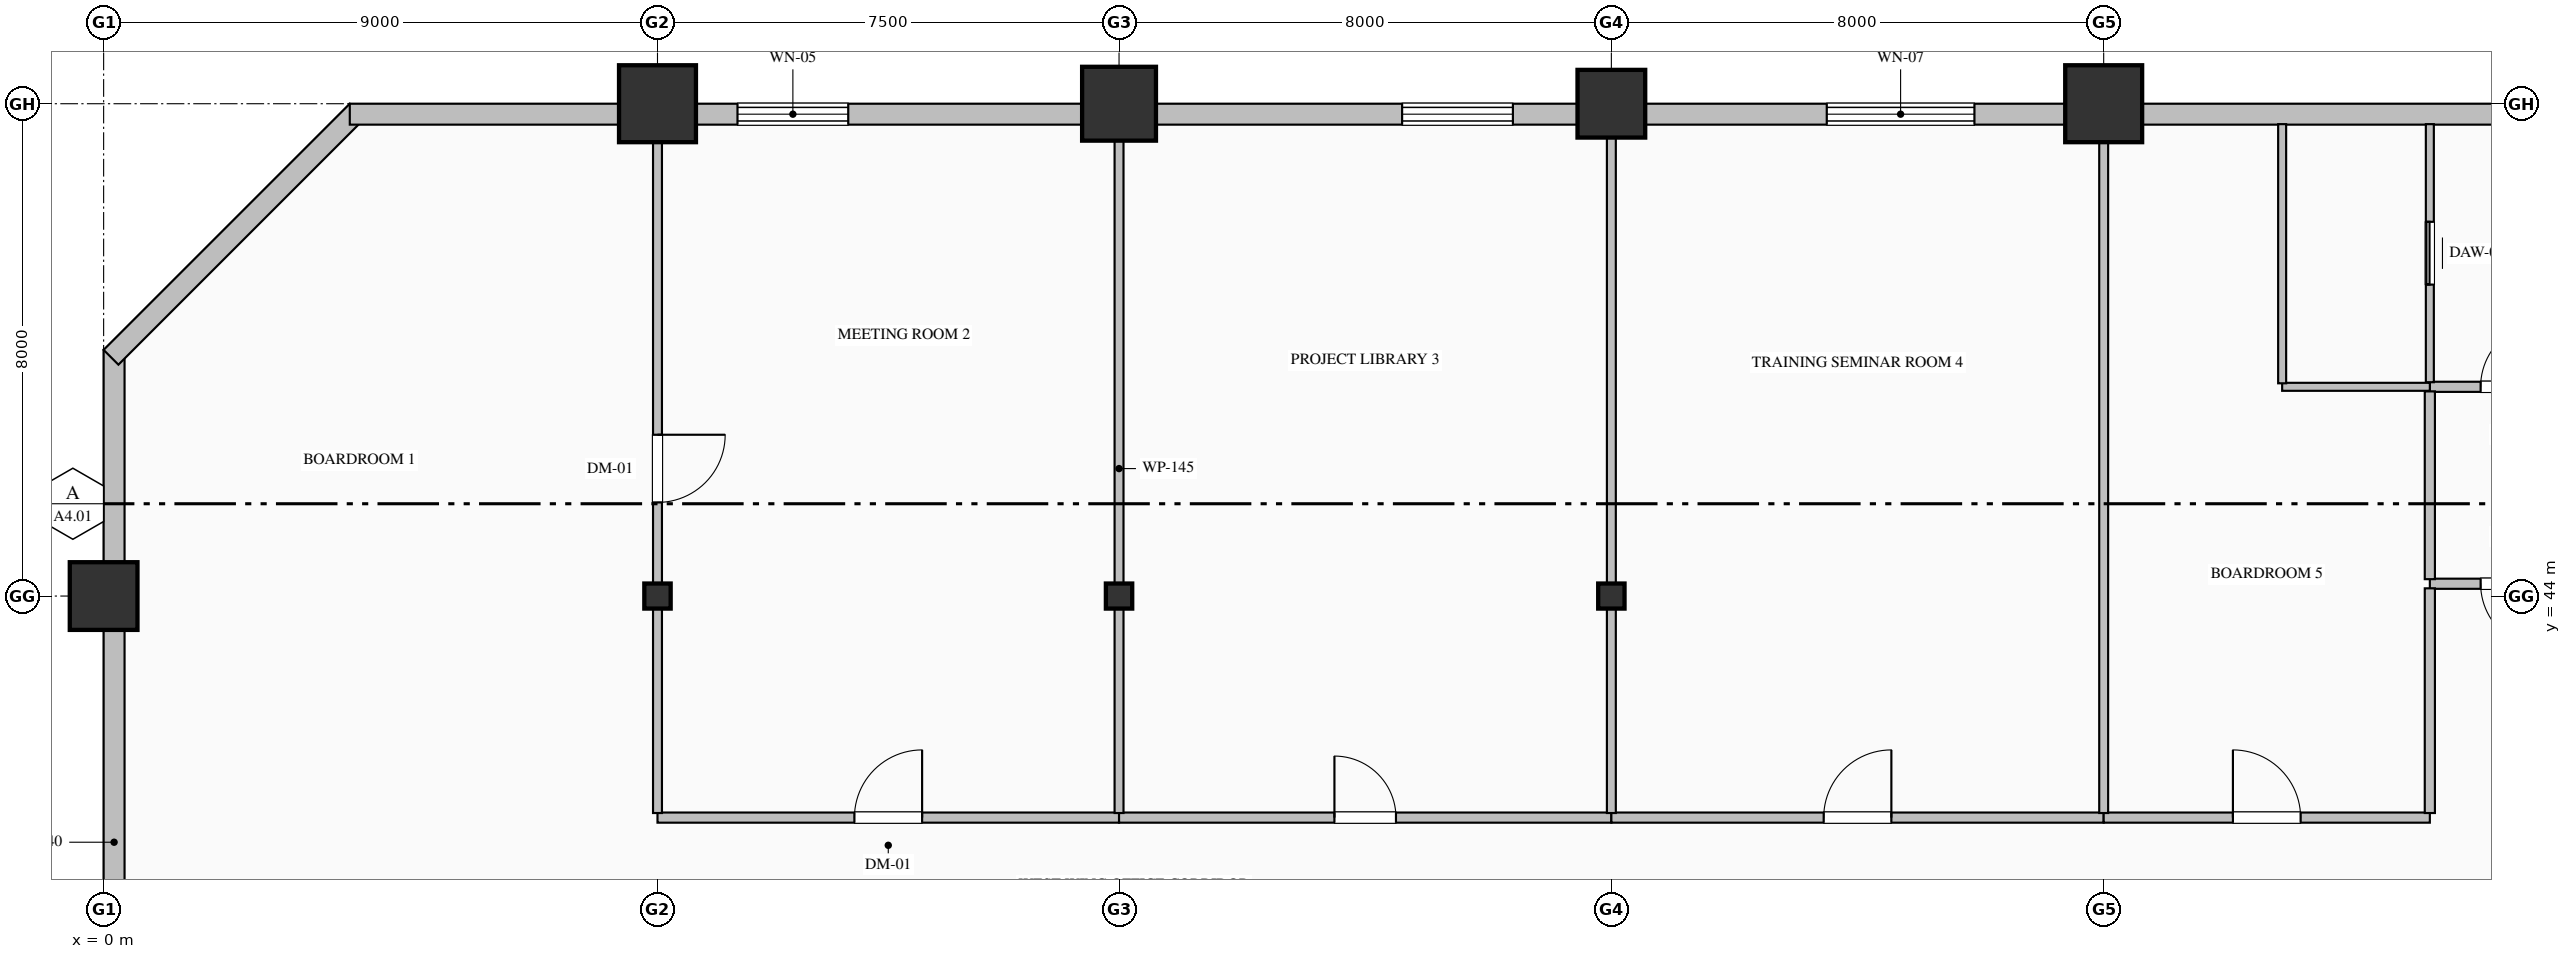
"""IFC4 building model, lengths in metres.
Left out: names, types, materials, properties, quantities, classifications, styles, units other than length and angle.
Written with IfcOpenShell. Run it as: python <this file> out.ifc"""

import sys

from ifc_helpers import new_model, si_unit, direction, frame, frame_2d, origin, origin_2d, place, context, subcontext, project, spatial, rectangle, hollow_rectangle, hollow_circle, i_section, extrude, element, fill, save


model = new_model("IFC4")
c1 = context("Model", 3, precision=1e-05, world=origin(), true_north=direction((0.0, 1.0)))
c2 = subcontext(c1, "Body", "Model", "MODEL_VIEW")
j1 = project(units=[si_unit("LENGTHUNIT", "METRE"), si_unit("PLANEANGLEUNIT", "RADIAN")], contexts=[c1])
p1 = place(None, origin())
s1 = spatial("IfcSite", under=j1, at=p1, CompositionType="ELEMENT")
p2 = place(p1, origin())
s2 = spatial("IfcBuilding", under=s1, at=p2, CompositionType="ELEMENT")
p3 = place(p2, frame((0.0, 0.0, 52.2)))
s3 = spatial("IfcBuildingStorey", under=s2, at=p3, CompositionType="ELEMENT", Elevation=52.2)
p4 = place(p3, frame((0.0, 44.0, 0.0), z_axis=(0.0, 0.0, 1.0), x_axis=(1.0, 0.0, 0.0)))
e1 = element("IfcColumn", 1, at=p4, inside=s3, PredefinedType="COLUMN", context=c2, shape_type="SweptSolid", body=[
    extrude(hollow_rectangle(XDim=1.1, YDim=1.1, WallThickness=0.04, at=origin_2d()), origin(), (0.0, 0.0, 1.0), 4.0),
])
p5 = place(p3, frame((9.0, 44.0, 0.0), z_axis=(0.0, 0.0, 1.0), x_axis=(1.0, 0.0, 0.0)))
e2 = element("IfcColumn", 2, at=p5, inside=s3, PredefinedType="COLUMN", context=c2, shape_type="SweptSolid", body=[
    extrude(i_section(OverallWidth=0.407, OverallDepth=0.428, WebThickness=0.02, FlangeThickness=0.035, FilletRadius=0.022, at=origin_2d()), origin(), (0.0, 0.0, 1.0), 4.0),
])
p6 = place(p3, frame((9.0, 52.0, 0.0), z_axis=(0.0, 0.0, 1.0), x_axis=(1.0, 0.0, 0.0)))
e3 = element("IfcColumn", 3, at=p6, inside=s3, PredefinedType="COLUMN", context=c2, shape_type="SweptSolid", body=[
    extrude(hollow_rectangle(XDim=1.25, YDim=1.25, WallThickness=0.045, at=origin_2d()), origin(), (0.0, 0.0, 1.0), 4.0),
])
p7 = place(p3, frame((16.5, 44.0, 0.0), z_axis=(0.0, 0.0, 1.0), x_axis=(1.0, 0.0, 0.0)))
e4 = element("IfcColumn", 4, at=p7, inside=s3, PredefinedType="COLUMN", context=c2, shape_type="SweptSolid", body=[
    extrude(i_section(OverallWidth=0.407, OverallDepth=0.428, WebThickness=0.02, FlangeThickness=0.035, FilletRadius=0.022, at=origin_2d()), origin(), (0.0, 0.0, 1.0), 4.0),
])
p8 = place(p3, frame((16.5, 52.0, 0.0), z_axis=(0.0, 0.0, 1.0), x_axis=(1.0, 0.0, 0.0)))
e5 = element("IfcColumn", 5, at=p8, inside=s3, PredefinedType="COLUMN", context=c2, shape_type="SweptSolid", body=[
    extrude(hollow_circle(Radius=0.6, WallThickness=0.04, at=origin_2d()), origin(), (0.0, 0.0, 1.0), 4.0),
])
p9 = place(p3, frame((24.5, 44.0, 0.0), z_axis=(0.0, 0.0, 1.0), x_axis=(1.0, 0.0, 0.0)))
e6 = element("IfcColumn", 6, at=p9, inside=s3, PredefinedType="COLUMN", context=c2, shape_type="SweptSolid", body=[
    extrude(i_section(OverallWidth=0.407, OverallDepth=0.428, WebThickness=0.02, FlangeThickness=0.035, FilletRadius=0.022, at=origin_2d()), origin(), (0.0, 0.0, 1.0), 4.0),
])
p10 = place(p3, frame((24.5, 52.0, 0.0), z_axis=(0.0, 0.0, 1.0), x_axis=(1.0, 0.0, 0.0)))
e7 = element("IfcColumn", 7, at=p10, inside=s3, PredefinedType="COLUMN", context=c2, shape_type="SweptSolid", body=[
    extrude(hollow_rectangle(XDim=1.1, YDim=1.1, WallThickness=0.04, at=origin_2d()), origin(), (0.0, 0.0, 1.0), 4.0),
])
p11 = place(p3, frame((32.5, 52.0, 0.0), z_axis=(0.0, 0.0, 1.0), x_axis=(1.0, 0.0, 0.0)))
e8 = element("IfcColumn", 8, at=p11, inside=s3, PredefinedType="COLUMN", context=c2, shape_type="SweptSolid", body=[
    extrude(hollow_rectangle(XDim=1.25, YDim=1.25, WallThickness=0.045, at=origin_2d()), origin(), (0.0, 0.0, 1.0), 4.0),
])
p12 = place(p3, frame((0.17, 32.0, 0.0), z_axis=(0.0, 0.0, 1.0), x_axis=(0.0, 1.0, 0.0)))
e9 = element("IfcWall", 9, at=p12, inside=s3, PredefinedType="SOLIDWALL", context=c2, shape_type="SweptSolid", body=[
    extrude(rectangle(XDim=16.0, YDim=0.34, at=frame_2d((8.0, 0.0))), origin(), (0.0, 0.0, 1.0), 3.25),
])
p13 = place(p3, frame((0.12, 47.88, 0.0), z_axis=(0.0, 0.0, 1.0), x_axis=(0.707106781187, 0.707106781187, 0.0)))
e10 = element("IfcWall", 10, at=p13, inside=s3, PredefinedType="SOLIDWALL", context=c2, shape_type="SweptSolid", body=[
    extrude(rectangle(XDim=5.657, YDim=0.34, at=frame_2d((2.828, 0.0))), origin(), (0.0, 0.0, 1.0), 3.75),
])
p14 = place(p3, frame((4.0, 51.83, 0.0), z_axis=(0.0, 0.0, 1.0), x_axis=(1.0, 0.0, 0.0)))
e11 = element("IfcWall", 11, at=p14, inside=s3, PredefinedType="SOLIDWALL", context=c2, shape_type="SweptSolid", body=[
    extrude(rectangle(XDim=36.52, YDim=0.34, at=frame_2d((18.26, 0.0))), origin(), (0.0, 0.0, 1.0), 3.25),
])
p15 = place(p14, frame((6.3, 0.0, 0.85)))
e12 = element("IfcOpeningElement", 12, at=p15, cuts=e11, PredefinedType="OPENING", context=c2, shape_type="SweptSolid", body=[
    extrude(rectangle(XDim=1.8, YDim=2.05, at=frame_2d((0.9, 1.025))), frame((0.0, 0.18, 0.0), z_axis=(0.0, -1.0, 0.0), x_axis=(1.0, 0.0, 0.0)), (0.0, 0.0, 1.0), 0.36),
])
p16 = place(p14, frame((17.1, 0.0, 0.85)))
e13 = element("IfcOpeningElement", 13, at=p16, cuts=e11, PredefinedType="OPENING", context=c2, shape_type="SweptSolid", body=[
    extrude(rectangle(XDim=1.8, YDim=2.05, at=frame_2d((0.9, 1.025))), frame((0.0, 0.18, 0.0), z_axis=(0.0, -1.0, 0.0), x_axis=(1.0, 0.0, 0.0)), (0.0, 0.0, 1.0), 0.36),
])
p17 = place(p14, frame((24.0, 0.0, 0.8)))
e14 = element("IfcOpeningElement", 14, at=p17, cuts=e11, PredefinedType="OPENING", context=c2, shape_type="SweptSolid", body=[
    extrude(rectangle(XDim=2.4, YDim=2.15, at=frame_2d((1.2, 1.075))), frame((0.0, 0.18, 0.0), z_axis=(0.0, -1.0, 0.0), x_axis=(1.0, 0.0, 0.0)), (0.0, 0.0, 1.0), 0.36),
])
p18 = place(p3, frame((37.8, 47.4, 0.0), z_axis=(0.0, 0.0, 1.0), x_axis=(1.0, 0.0, 0.0)))
e15 = element("IfcWall", 15, at=p18, inside=s3, PredefinedType="PARTITIONING", context=c2, shape_type="SweptSolid", body=[
    extrude(rectangle(XDim=2.7, YDim=0.165, at=frame_2d((1.35, 0.0))), origin(), (0.0, 0.0, 1.0), 3.75),
])
p19 = place(p18, frame((0.825, 0.0, 0.0)))
e16 = element("IfcOpeningElement", 16, at=p19, cuts=e15, PredefinedType="OPENING", context=c2, shape_type="SweptSolid", body=[
    extrude(rectangle(XDim=1.05, YDim=2.15, at=frame_2d((0.525, 1.075))), frame((0.0, 0.093, 0.0), z_axis=(0.0, -1.0, 0.0), x_axis=(1.0, 0.0, 0.0)), (0.0, 0.0, 1.0), 0.185),
])
p20 = place(p3, frame((40.5, 44.2, 0.0), z_axis=(0.0, 0.0, 1.0), x_axis=(-1.0, 0.0, 0.0)))
e17 = element("IfcWall", 17, at=p20, inside=s3, PredefinedType="PARTITIONING", context=c2, shape_type="SweptSolid", body=[
    extrude(rectangle(XDim=2.7, YDim=0.165, at=frame_2d((1.35, 0.0))), origin(), (0.0, 0.0, 1.0), 3.75),
])
p21 = place(p20, frame((0.825, 0.0, 0.0)))
e18 = element("IfcOpeningElement", 18, at=p21, cuts=e17, PredefinedType="OPENING", context=c2, shape_type="SweptSolid", body=[
    extrude(rectangle(XDim=1.05, YDim=2.15, at=frame_2d((0.525, 1.075))), frame((0.0, 0.093, 0.0), z_axis=(0.0, -1.0, 0.0), x_axis=(1.0, 0.0, 0.0)), (0.0, 0.0, 1.0), 0.185),
])
p22 = place(p3, frame((37.8, 44.274, 0.0), z_axis=(0.0, 0.0, 1.0), x_axis=(0.0, 1.0, 0.0)))
e19 = element("IfcWall", 19, at=p22, inside=s3, PredefinedType="PARTITIONING", context=c2, shape_type="SweptSolid", body=[
    extrude(rectangle(XDim=3.051, YDim=0.165, at=frame_2d((1.525, 0.0))), origin(), (0.0, 0.0, 1.0), 3.75),
])
p23 = place(p3, frame((37.8, 47.475, 0.0), z_axis=(0.0, 0.0, 1.0), x_axis=(0.0, 1.0, 0.0)))
e20 = element("IfcWall", 20, at=p23, inside=s3, PredefinedType="PARTITIONING", context=c2, shape_type="SweptSolid", body=[
    extrude(rectangle(XDim=4.193, YDim=0.13, at=frame_2d((2.097, 0.0))), origin(), (0.0, 0.0, 1.0), 3.75),
])
p24 = place(p23, frame((1.587, 0.0, 0.0)))
e21 = element("IfcOpeningElement", 21, at=p24, cuts=e20, PredefinedType="OPENING", context=c2, shape_type="SweptSolid", body=[
    extrude(rectangle(XDim=1.02, YDim=2.15, at=frame_2d((0.51, 1.075))), frame((0.0, 0.075, 0.0), z_axis=(0.0, -1.0, 0.0), x_axis=(1.0, 0.0, 0.0)), (0.0, 0.0, 1.0), 0.15),
])
p25 = place(p3, frame((37.8, 47.4, 0.0), z_axis=(0.0, 0.0, 1.0), x_axis=(-1.0, 0.0, 0.0)))
e22 = element("IfcWall", 22, at=p25, inside=s3, PredefinedType="PARTITIONING", context=c2, shape_type="SweptSolid", body=[
    extrude(rectangle(XDim=2.4, YDim=0.13, at=frame_2d((1.2, 0.0))), origin(), (0.0, 0.0, 1.0), 3.75),
])
p26 = place(p3, frame((35.4, 47.457, 0.0), z_axis=(0.0, 0.0, 1.0), x_axis=(0.0, 1.0, 0.0)))
e23 = element("IfcWall", 23, at=p26, inside=s3, PredefinedType="PARTITIONING", context=c2, shape_type="SweptSolid", body=[
    extrude(rectangle(XDim=4.211, YDim=0.13, at=frame_2d((2.105, 0.0))), origin(), (0.0, 0.0, 1.0), 3.75),
])
p27 = place(p3, frame((9.0, 40.4, 0.0), z_axis=(0.0, 0.0, 1.0), x_axis=(1.0, 0.0, 0.0)))
e24 = element("IfcWall", 24, at=p27, inside=s3, PredefinedType="PARTITIONING", context=c2, shape_type="SweptSolid", body=[
    extrude(rectangle(XDim=7.5, YDim=0.165, at=frame_2d((3.75, 0.0))), origin(), (0.0, 0.0, 1.0), 3.75),
])
p28 = place(p27, frame((3.2, 0.0, 0.0)))
e25 = element("IfcOpeningElement", 25, at=p28, cuts=e24, PredefinedType="OPENING", context=c2, shape_type="SweptSolid", body=[
    extrude(rectangle(XDim=1.1, YDim=2.2, at=frame_2d((0.55, 1.1))), frame((0.0, 0.093, 0.0), z_axis=(0.0, -1.0, 0.0), x_axis=(1.0, 0.0, 0.0)), (0.0, 0.0, 1.0), 0.185),
])
p29 = place(p3, frame((16.5, 40.4, 0.0), z_axis=(0.0, 0.0, 1.0), x_axis=(1.0, 0.0, 0.0)))
e26 = element("IfcWall", 26, at=p29, inside=s3, PredefinedType="PARTITIONING", context=c2, shape_type="SweptSolid", body=[
    extrude(rectangle(XDim=8.0, YDim=0.165, at=frame_2d((4.0, 0.0))), origin(), (0.0, 0.0, 1.0), 3.75),
])
p30 = place(p29, frame((3.5, 0.0, 0.0)))
e27 = element("IfcOpeningElement", 27, at=p30, cuts=e26, PredefinedType="OPENING", context=c2, shape_type="SweptSolid", body=[
    extrude(rectangle(XDim=1.0, YDim=2.15, at=frame_2d((0.5, 1.075))), frame((0.0, 0.093, 0.0), z_axis=(0.0, -1.0, 0.0), x_axis=(1.0, 0.0, 0.0)), (0.0, 0.0, 1.0), 0.185),
])
p31 = place(p3, frame((24.5, 40.4, 0.0), z_axis=(0.0, 0.0, 1.0), x_axis=(1.0, 0.0, 0.0)))
e28 = element("IfcWall", 28, at=p31, inside=s3, PredefinedType="PARTITIONING", context=c2, shape_type="SweptSolid", body=[
    extrude(rectangle(XDim=8.0, YDim=0.165, at=frame_2d((4.0, 0.0))), origin(), (0.0, 0.0, 1.0), 3.75),
])
p32 = place(p31, frame((3.45, 0.0, 0.0)))
e29 = element("IfcOpeningElement", 29, at=p32, cuts=e28, PredefinedType="OPENING", context=c2, shape_type="SweptSolid", body=[
    extrude(rectangle(XDim=1.1, YDim=2.2, at=frame_2d((0.55, 1.1))), frame((0.0, 0.093, 0.0), z_axis=(0.0, -1.0, 0.0), x_axis=(1.0, 0.0, 0.0)), (0.0, 0.0, 1.0), 0.185),
])
p33 = place(p3, frame((32.5, 40.4, 0.0), z_axis=(0.0, 0.0, 1.0), x_axis=(1.0, 0.0, 0.0)))
e30 = element("IfcWall", 30, at=p33, inside=s3, PredefinedType="PARTITIONING", context=c2, shape_type="SweptSolid", body=[
    extrude(rectangle(XDim=5.3, YDim=0.165, at=frame_2d((2.65, 0.0))), origin(), (0.0, 0.0, 1.0), 3.75),
])
p34 = place(p33, frame((2.1, 0.0, 0.0)))
e31 = element("IfcOpeningElement", 31, at=p34, cuts=e30, PredefinedType="OPENING", context=c2, shape_type="SweptSolid", body=[
    extrude(rectangle(XDim=1.1, YDim=2.2, at=frame_2d((0.55, 1.1))), frame((0.0, 0.093, 0.0), z_axis=(0.0, -1.0, 0.0), x_axis=(1.0, 0.0, 0.0)), (0.0, 0.0, 1.0), 0.185),
])
p35 = place(p3, frame((37.8, 40.475, 0.0), z_axis=(0.0, 0.0, 1.0), x_axis=(0.0, 1.0, 0.0)))
e32 = element("IfcWall", 32, at=p35, inside=s3, PredefinedType="PARTITIONING", context=c2, shape_type="SweptSolid", body=[
    extrude(rectangle(XDim=3.651, YDim=0.165, at=frame_2d((1.825, 0.0))), origin(), (0.0, 0.0, 1.0), 3.75),
])
p36 = place(p3, frame((9.0, 51.668, 0.0), z_axis=(0.0, 0.0, 1.0), x_axis=(0.0, -1.0, 0.0)))
e33 = element("IfcWall", 33, at=p36, inside=s3, PredefinedType="PARTITIONING", context=c2, shape_type="SweptSolid", body=[
    extrude(rectangle(XDim=11.193, YDim=0.145, at=frame_2d((5.597, 0.0))), origin(), (0.0, 0.0, 1.0), 3.042),
])
p37 = place(p36, frame((5.047, 0.0, 0.0)))
e34 = element("IfcOpeningElement", 34, at=p37, cuts=e33, PredefinedType="OPENING", context=c2, shape_type="SweptSolid", body=[
    extrude(rectangle(XDim=1.1, YDim=2.2, at=frame_2d((0.55, 1.1))), frame((0.0, 0.083, 0.0), z_axis=(0.0, -1.0, 0.0), x_axis=(1.0, 0.0, 0.0)), (0.0, 0.0, 1.0), 0.165),
])
for number, where, z_axis, x_axis in (
    (35, (16.5, 51.668, 0.0), (0.0, 0.0, 1.0), (0.0, -1.0, 0.0)),
    (36, (24.5, 51.668, 0.0), (0.0, 0.0, 1.0), (0.0, -1.0, 0.0)),
):
    element("IfcWall", number, at=place(p3, frame(where, z_axis=z_axis, x_axis=x_axis)), inside=s3, PredefinedType="PARTITIONING", context=c2, shape_type="SweptSolid", body=[
        extrude(rectangle(XDim=11.193, YDim=0.145, at=frame_2d((5.597, 0.0))), origin(), (0.0, 0.0, 1.0), 3.042),
    ])
p38 = place(p3, frame((32.5, 51.668, 0.0), z_axis=(0.0, 0.0, 1.0), x_axis=(0.0, -1.0, 0.0)))
e37 = element("IfcWall", 37, at=p38, inside=s3, PredefinedType="PARTITIONING", context=c2, shape_type="SweptSolid", body=[
    extrude(rectangle(XDim=11.193, YDim=0.145, at=frame_2d((5.597, 0.0))), origin(), (0.0, 0.0, 1.0), 3.75),
])
p39 = place(p15, origin())
e38 = element("IfcWindow", 38, at=p39, inside=s3, PartitioningType="TRIPLE_PANEL_VERTICAL", PredefinedType="WINDOW", context=c2, shape_type="SweptSolid", body=[
    extrude(rectangle(XDim=1.8, YDim=2.05, at=frame_2d((0.9, 1.025))), frame((0.0, 0.15, 0.0), z_axis=(0.0, -1.0, 0.0), x_axis=(1.0, 0.0, 0.0)), (0.0, 0.0, 1.0), 0.06),
])
fill(e12, e38)
p40 = place(p16, origin())
e39 = element("IfcWindow", 39, at=p40, inside=s3, PartitioningType="TRIPLE_PANEL_VERTICAL", PredefinedType="WINDOW", context=c2, shape_type="SweptSolid", body=[
    extrude(rectangle(XDim=1.8, YDim=2.05, at=frame_2d((0.9, 1.025))), frame((0.0, 0.15, 0.0), z_axis=(0.0, -1.0, 0.0), x_axis=(1.0, 0.0, 0.0)), (0.0, 0.0, 1.0), 0.06),
])
fill(e13, e39)
p41 = place(p17, origin())
e40 = element("IfcWindow", 40, at=p41, inside=s3, PartitioningType="TRIPLE_PANEL_VERTICAL", PredefinedType="WINDOW", context=c2, shape_type="SweptSolid", body=[
    extrude(rectangle(XDim=2.4, YDim=2.15, at=frame_2d((1.2, 1.075))), frame((0.0, 0.15, 0.0), z_axis=(0.0, -1.0, 0.0), x_axis=(1.0, 0.0, 0.0)), (0.0, 0.0, 1.0), 0.06),
])
fill(e14, e40)
p42 = place(p19, origin())
e41 = element("IfcDoor", 41, at=p42, inside=s3, OperationType="SINGLE_SWING_RIGHT", PredefinedType="DOOR", context=c2, shape_type="SweptSolid", body=[
    extrude(rectangle(XDim=1.05, YDim=2.15, at=frame_2d((0.525, 1.075))), frame((0.0, 0.025, 0.0), z_axis=(0.0, -1.0, 0.0), x_axis=(1.0, 0.0, 0.0)), (0.0, 0.0, 1.0), 0.05),
])
fill(e16, e41)
p43 = place(p21, origin())
e42 = element("IfcDoor", 42, at=p43, inside=s3, OperationType="SINGLE_SWING_LEFT", PredefinedType="DOOR", context=c2, shape_type="SweptSolid", body=[
    extrude(rectangle(XDim=1.05, YDim=2.15, at=frame_2d((0.525, 1.075))), frame((0.0, 0.025, 0.0), z_axis=(0.0, -1.0, 0.0), x_axis=(1.0, 0.0, 0.0)), (0.0, 0.0, 1.0), 0.05),
])
fill(e18, e42)
p44 = place(p24, origin())
e43 = element("IfcDoor", 43, at=p44, inside=s3, OperationType="SLIDING_TO_LEFT", PredefinedType="DOOR", context=c2, shape_type="SweptSolid", body=[
    extrude(rectangle(XDim=1.02, YDim=2.15, at=frame_2d((0.51, 1.075))), frame((0.0, 0.025, 0.0), z_axis=(0.0, -1.0, 0.0), x_axis=(1.0, 0.0, 0.0)), (0.0, 0.0, 1.0), 0.05),
])
fill(e21, e43)
p45 = place(p37, origin())
e44 = element("IfcDoor", 44, at=p45, inside=s3, OperationType="SINGLE_SWING_LEFT", PredefinedType="DOOR", context=c2, shape_type="SweptSolid", body=[
    extrude(rectangle(XDim=1.1, YDim=2.2, at=frame_2d((0.55, 1.1))), frame((0.0, 0.025, 0.0), z_axis=(0.0, -1.0, 0.0), x_axis=(1.0, 0.0, 0.0)), (0.0, 0.0, 1.0), 0.05),
])
fill(e34, e44)
p46 = place(p28, origin())
e45 = element("IfcDoor", 45, at=p46, inside=s3, OperationType="SINGLE_SWING_RIGHT", PredefinedType="DOOR", context=c2, shape_type="SweptSolid", body=[
    extrude(rectangle(XDim=1.1, YDim=2.2, at=frame_2d((0.55, 1.1))), frame((0.0, 0.025, 0.0), z_axis=(0.0, -1.0, 0.0), x_axis=(1.0, 0.0, 0.0)), (0.0, 0.0, 1.0), 0.05),
])
fill(e25, e45)
p47 = place(p30, origin())
e46 = element("IfcDoor", 46, at=p47, inside=s3, OperationType="SINGLE_SWING_LEFT", PredefinedType="DOOR", context=c2, shape_type="SweptSolid", body=[
    extrude(rectangle(XDim=1.0, YDim=2.15, at=frame_2d((0.5, 1.075))), frame((0.0, 0.025, 0.0), z_axis=(0.0, -1.0, 0.0), x_axis=(1.0, 0.0, 0.0)), (0.0, 0.0, 1.0), 0.05),
])
fill(e27, e46)
p48 = place(p32, origin())
e47 = element("IfcDoor", 47, at=p48, inside=s3, OperationType="SINGLE_SWING_RIGHT", PredefinedType="DOOR", context=c2, shape_type="SweptSolid", body=[
    extrude(rectangle(XDim=1.1, YDim=2.2, at=frame_2d((0.55, 1.1))), frame((0.0, 0.025, 0.0), z_axis=(0.0, -1.0, 0.0), x_axis=(1.0, 0.0, 0.0)), (0.0, 0.0, 1.0), 0.05),
])
fill(e29, e47)
p49 = place(p34, origin())
e48 = element("IfcDoor", 48, at=p49, inside=s3, OperationType="SINGLE_SWING_LEFT", PredefinedType="DOOR", context=c2, shape_type="SweptSolid", body=[
    extrude(rectangle(XDim=1.1, YDim=2.2, at=frame_2d((0.55, 1.1))), frame((0.0, 0.025, 0.0), z_axis=(0.0, -1.0, 0.0), x_axis=(1.0, 0.0, 0.0)), (0.0, 0.0, 1.0), 0.05),
])
fill(e31, e48)
save(model, sys.argv[1])
